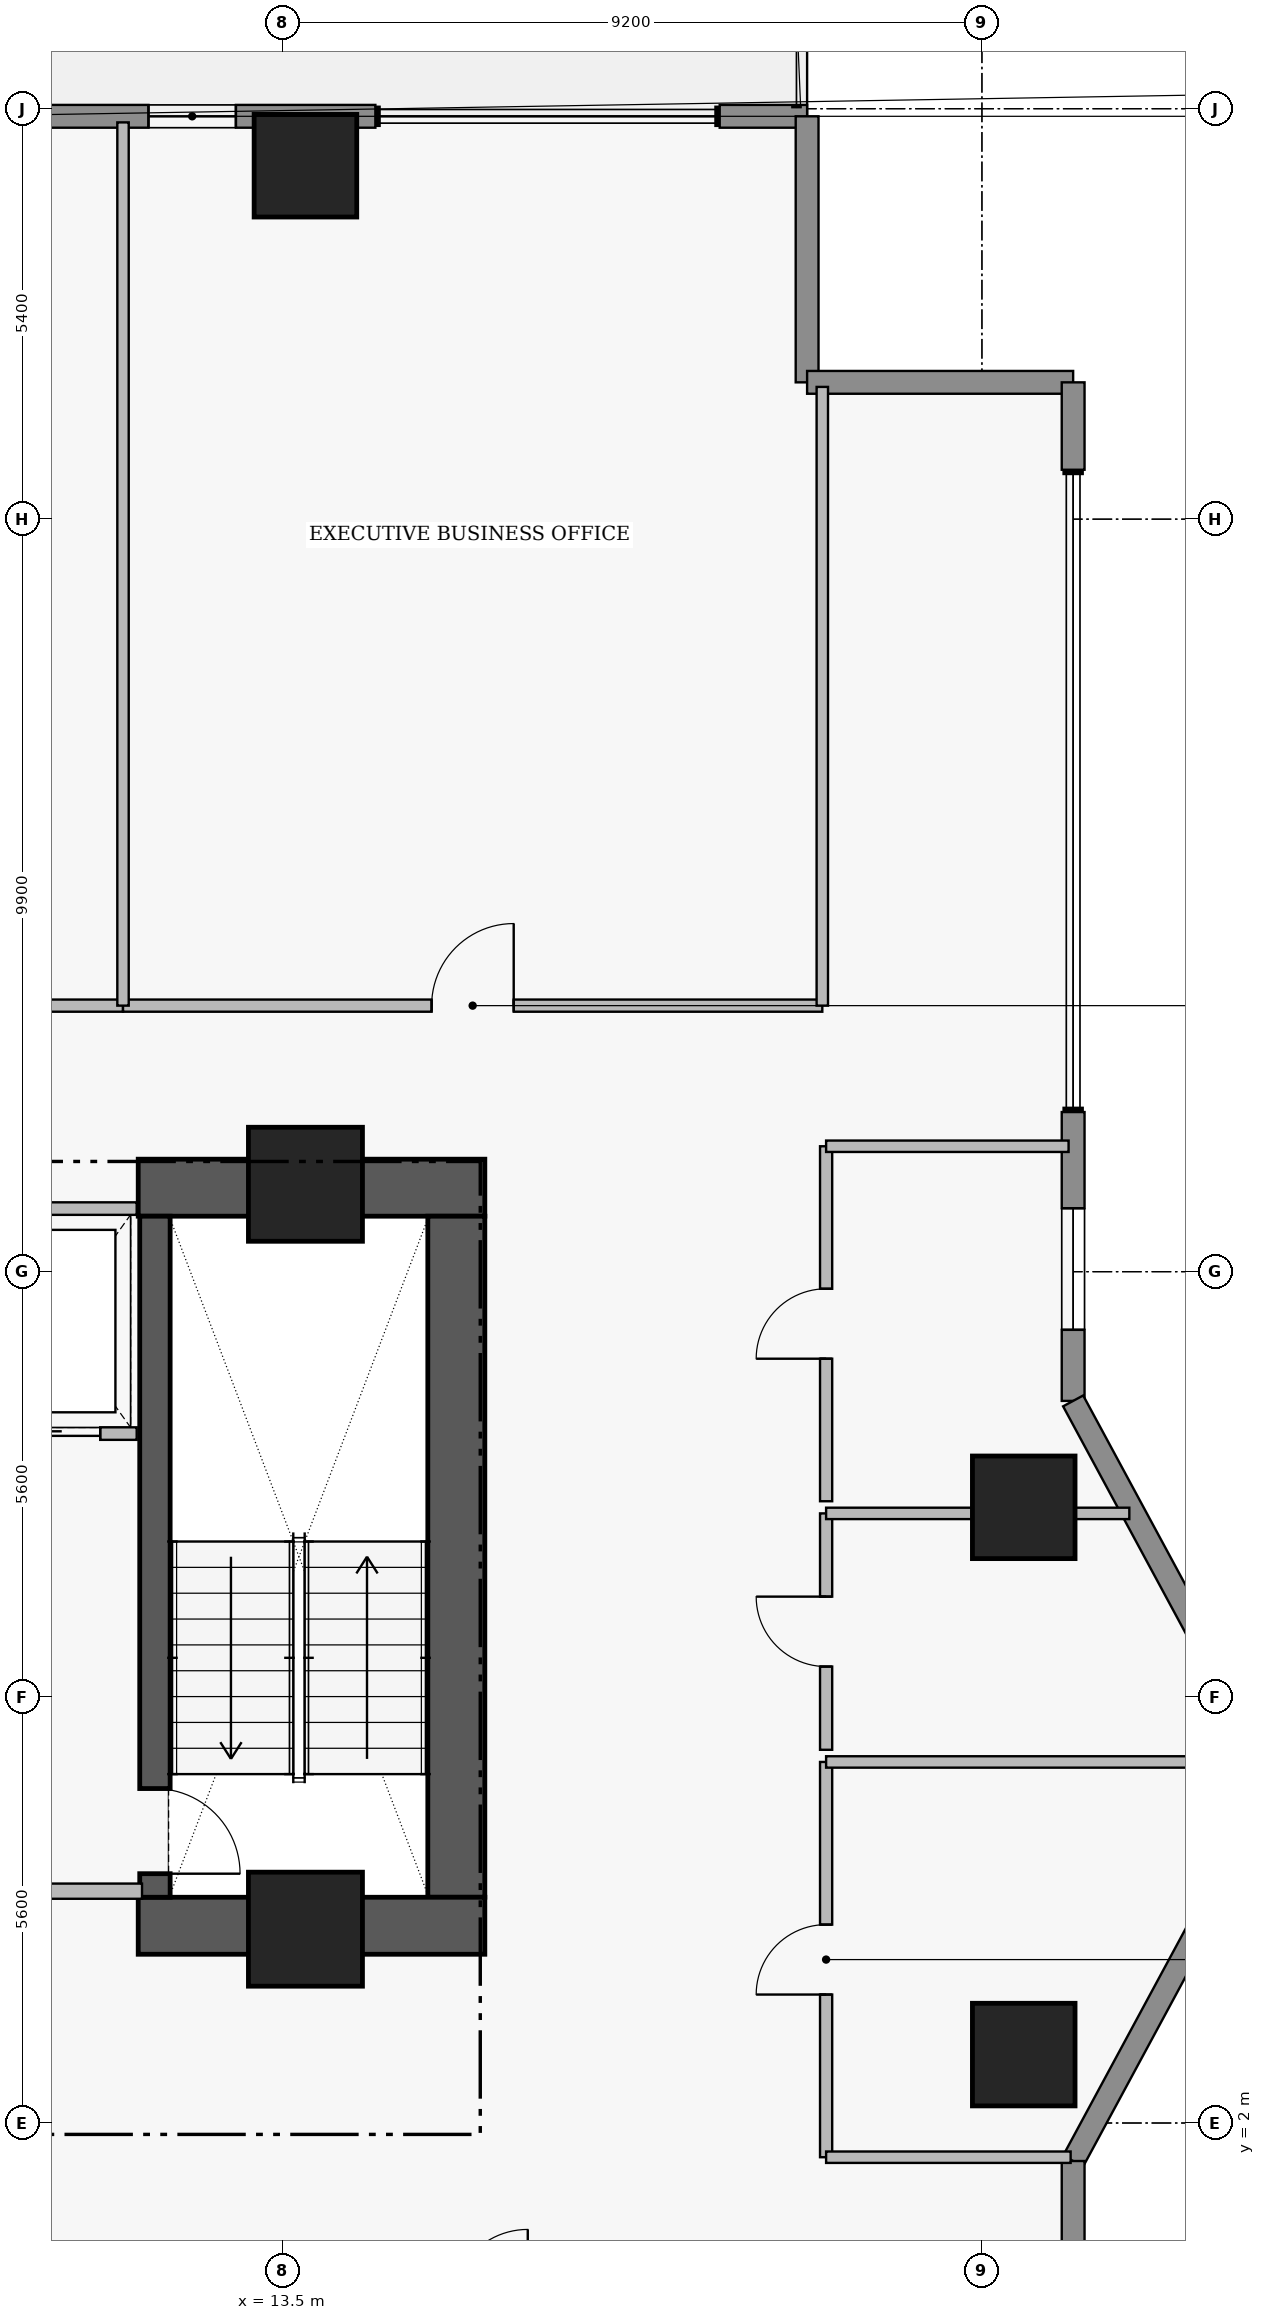
"""IFC4 building model, lengths in metres.
Left out: names, types, materials, properties, quantities, classifications, styles, units other than length and angle.
Written with IfcOpenShell. Run it as: python <this file> out.ifc"""

import sys

from ifc_helpers import new_model, si_unit, direction, frame, frame_2d, origin, origin_2d, place, context, subcontext, project, spatial, rectangle, extrude, element, fill, save


model = new_model("IFC4")
c1 = context("Model", 3, precision=1e-05, world=origin(), true_north=direction((0.0, 1.0)))
c2 = subcontext(c1, "Body", "Model", "MODEL_VIEW")
j1 = project(units=[si_unit("LENGTHUNIT", "METRE"), si_unit("PLANEANGLEUNIT", "RADIAN")], contexts=[c1])
p1 = place(None, origin())
s1 = spatial("IfcSite", under=j1, at=p1, CompositionType="ELEMENT")
p2 = place(p1, origin())
s2 = spatial("IfcBuilding", under=s1, at=p2, CompositionType="ELEMENT")
p3 = place(p2, frame((0.0, 0.0, 117.55)))
s3 = spatial("IfcBuildingStorey", under=s2, at=p3, CompositionType="ELEMENT", Elevation=117.55)
p4 = place(p3, frame((11.6, 14.305, 0.0), z_axis=(0.0, 0.0, 1.0), x_axis=(1.0, 0.0, 0.0)))
e1 = element("IfcWall", 1, at=p4, inside=s3, PredefinedType="SHEAR", context=c2, shape_type="SweptSolid", body=[
    extrude(rectangle(XDim=4.56, YDim=0.75, at=frame_2d((2.28, 0.0))), origin(), (0.0, 0.0, 1.0), 3.46),
])
p5 = place(p3, frame((15.785, 4.97, 0.0), z_axis=(0.0, 0.0, 1.0), x_axis=(0.0, 1.0, 0.0)))
e2 = element("IfcWall", 2, at=p5, inside=s3, PredefinedType="SHEAR", context=c2, shape_type="SweptSolid", body=[
    extrude(rectangle(XDim=8.96, YDim=0.75, at=frame_2d((4.48, 0.0))), origin(), (0.0, 0.0, 1.0), 3.46),
])
p6 = place(p3, frame((11.6, 4.595, 0.0), z_axis=(0.0, 0.0, 1.0), x_axis=(1.0, 0.0, 0.0)))
e3 = element("IfcWall", 3, at=p6, inside=s3, PredefinedType="SHEAR", context=c2, shape_type="SweptSolid", body=[
    extrude(rectangle(XDim=4.56, YDim=0.75, at=frame_2d((2.28, 0.0))), origin(), (0.0, 0.0, 1.0), 3.46),
])
p7 = place(p3, frame((11.82, 13.93, 0.0), z_axis=(0.0, 0.0, 1.0), x_axis=(0.0, -1.0, 0.0)))
e4 = element("IfcWall", 4, at=p7, inside=s3, PredefinedType="SHEAR", context=c2, shape_type="SweptSolid", body=[
    extrude(rectangle(XDim=8.96, YDim=0.4, at=frame_2d((4.48, 0.0))), origin(), (0.0, 0.0, 1.0), 3.46),
])
p8 = place(p7, frame((7.53, 0.0, 0.0)))
e5 = element("IfcOpeningElement", 5, at=p8, cuts=e4, PredefinedType="OPENING", context=c2, shape_type="SweptSolid", body=[
    extrude(rectangle(XDim=1.12, YDim=2.22, at=frame_2d((0.56, 1.11))), frame((0.0, 0.21, 0.0), z_axis=(0.0, -1.0, 0.0), x_axis=(1.0, 0.0, 0.0)), (0.0, 0.0, 1.0), 0.42),
])
for number, where, z_axis, x_axis in (
    (6, (13.8, 14.35, 0.0), (0.0, 0.0, 1.0), (1.0, 0.0, 0.0)),
    (7, (13.8, 4.55, 0.0), (0.0, 0.0, 1.0), (1.0, 0.0, 0.0)),
):
    element("IfcColumn", number, at=place(p3, frame(where, z_axis=z_axis, x_axis=x_axis)), inside=s3, PredefinedType="COLUMN", context=c2, shape_type="SweptSolid", body=[
        extrude(rectangle(XDim=1.5, YDim=1.5, at=origin_2d()), origin(), (0.0, 0.0, 1.0), 3.65),
    ])
for number, where, z_axis, x_axis in (
    (8, (13.8, 27.75, 0.0), (0.0, 0.0, 1.0), (1.0, 0.0, 0.0)),
    (9, (23.25, 2.9, 0.0), (0.0, 0.0, 1.0), (1.0, 0.0, 0.0)),
    (10, (23.25, 10.1, 0.0), (0.0, 0.0, 1.0), (1.0, 0.0, 0.0)),
):
    element("IfcColumn", number, at=place(p3, frame(where, z_axis=z_axis, x_axis=x_axis)), inside=s3, PredefinedType="COLUMN", context=c2, shape_type="SweptSolid", body=[
        extrude(rectangle(XDim=1.35, YDim=1.35, at=origin_2d()), origin(), (0.0, 0.0, 1.0), 3.65),
    ])
p9 = place(p3, frame((7.885, 28.4, 0.0), z_axis=(0.0, 0.0, 1.0), x_axis=(1.0, 0.0, 0.0)))
e11 = element("IfcWall", 11, at=p9, inside=s3, PredefinedType="STANDARD", context=c2, shape_type="SweptSolid", body=[
    extrude(rectangle(XDim=6.835, YDim=0.3, at=frame_2d((3.417, 0.0))), origin(), (0.0, 0.0, 1.0), 3.43),
])
p10 = place(p9, frame((0.65, 0.0, 0.0)))
e12 = element("IfcOpeningElement", 12, at=p10, cuts=e11, PredefinedType="OPENING", context=c2, shape_type="SweptSolid", body=[
    extrude(rectangle(XDim=1.05, YDim=2.2, at=frame_2d((0.525, 1.1))), frame((0.0, 0.16, 0.0), z_axis=(0.0, -1.0, 0.0), x_axis=(1.0, 0.0, 0.0)), (0.0, 0.0, 1.0), 0.32),
])
p11 = place(p9, frame((3.85, 0.0, 0.95)))
e13 = element("IfcOpeningElement", 13, at=p11, cuts=e11, PredefinedType="OPENING", context=c2, shape_type="SweptSolid", body=[
    extrude(rectangle(XDim=1.15, YDim=1.55, at=frame_2d((0.575, 0.775))), frame((0.0, 0.16, 0.0), z_axis=(0.0, -1.0, 0.0), x_axis=(1.0, 0.0, 0.0)), (0.0, 0.0, 1.0), 0.32),
])
p12 = place(p3, frame((19.25, 28.4, 0.0), z_axis=(0.0, 0.0, 1.0), x_axis=(1.0, 0.0, 0.0)))
e14 = element("IfcWall", 14, at=p12, inside=s3, PredefinedType="STANDARD", context=c2, shape_type="SweptSolid", body=[
    extrude(rectangle(XDim=1.15, YDim=0.3, at=frame_2d((0.575, 0.0))), origin(), (0.0, 0.0, 1.0), 3.43),
])
for number, where, z_axis, x_axis in (
    (15, (20.4, 28.4, 0.0), (0.0, 0.0, 1.0), (0.0, -1.0, 0.0)),
    (16, (20.4, 24.9, 0.0), (0.0, 0.0, 1.0), (1.0, 0.0, 0.0)),
):
    element("IfcWall", number, at=place(p3, frame(where, z_axis=z_axis, x_axis=x_axis)), inside=s3, PredefinedType="STANDARD", context=c2, shape_type="SweptSolid", body=[
        extrude(rectangle(XDim=3.5, YDim=0.3, at=frame_2d((1.75, 0.0))), origin(), (0.0, 0.0, 1.0), 3.43),
    ])
p13 = place(p3, frame((23.9, 24.9, 0.0), z_axis=(0.0, 0.0, 1.0), x_axis=(0.0, -1.0, 0.0)))
e17 = element("IfcWall", 17, at=p13, inside=s3, PredefinedType="STANDARD", context=c2, shape_type="SweptSolid", body=[
    extrude(rectangle(XDim=1.15, YDim=0.3, at=frame_2d((0.575, 0.0))), origin(), (0.0, 0.0, 1.0), 3.43),
])
p14 = place(p3, frame((23.9, 15.3, 0.0), z_axis=(0.0, 0.0, 1.0), x_axis=(0.0, -1.0, 0.0)))
e18 = element("IfcWall", 18, at=p14, inside=s3, PredefinedType="STANDARD", context=c2, shape_type="SweptSolid", body=[
    extrude(rectangle(XDim=3.8, YDim=0.3, at=frame_2d((1.9, 0.0))), origin(), (0.0, 0.0, 1.0), 3.43),
])
p15 = place(p14, frame((1.265, 0.0, 0.85)))
e19 = element("IfcOpeningElement", 19, at=p15, cuts=e18, PredefinedType="OPENING", context=c2, shape_type="SweptSolid", body=[
    extrude(rectangle(XDim=1.6, YDim=1.8, at=frame_2d((0.8, 0.9))), frame((0.0, 0.16, 0.0), z_axis=(0.0, -1.0, 0.0), x_axis=(1.0, 0.0, 0.0)), (0.0, 0.0, 1.0), 0.32),
])
for number, where, z_axis, x_axis in (
    (20, (23.9, 11.5, 0.0), (0.0, 0.0, 1.0), (0.475, -0.88, 0.0)),
    (21, (26.6, 6.5, 0.0), (0.0, 0.0, 1.0), (-0.475, -0.88, 0.0)),
):
    element("IfcWall", number, at=place(p3, frame(where, z_axis=z_axis, x_axis=x_axis)), inside=s3, PredefinedType="STANDARD", context=c2, shape_type="SweptSolid", body=[
        extrude(rectangle(XDim=5.683, YDim=0.3, at=frame_2d((2.841, 0.0))), origin(), (0.0, 0.0, 1.0), 3.43),
    ])
p16 = place(p3, frame((23.9, 1.5, 0.0), z_axis=(0.0, 0.0, 1.0), x_axis=(0.0, -1.0, 0.0)))
e22 = element("IfcWall", 22, at=p16, inside=s3, PredefinedType="STANDARD", context=c2, shape_type="SweptSolid", body=[
    extrude(rectangle(XDim=1.15, YDim=0.3, at=frame_2d((0.575, 0.0))), origin(), (0.0, 0.0, 1.0), 3.43),
])
p17 = place(p3, frame((9.42, 11.07, 0.0), z_axis=(0.0, 0.0, 1.0), x_axis=(1.0, 0.0, 0.0)))
e23 = element("IfcWall", 23, at=p17, inside=s3, PredefinedType="PARTITIONING", context=c2, shape_type="SweptSolid", body=[
    extrude(rectangle(XDim=2.16, YDim=0.165, at=frame_2d((1.08, 0.0))), origin(), (0.0, 0.0, 1.0), 3.43),
])
p18 = place(p17, frame((0.53, 0.0, 0.0)))
e24 = element("IfcOpeningElement", 24, at=p18, cuts=e23, PredefinedType="OPENING", context=c2, shape_type="SweptSolid", body=[
    extrude(rectangle(XDim=1.15, YDim=2.25, at=frame_2d((0.575, 1.125))), frame((0.0, 0.093, 0.0), z_axis=(0.0, -1.0, 0.0), x_axis=(1.0, 0.0, 0.0)), (0.0, 0.0, 1.0), 0.185),
])
p19 = place(p3, frame((3.6, 16.7, 0.0), z_axis=(0.0, 0.0, 1.0), x_axis=(1.0, 0.0, 0.0)))
e25 = element("IfcWall", 25, at=p19, inside=s3, PredefinedType="PARTITIONING", context=c2, shape_type="SweptSolid", body=[
    extrude(rectangle(XDim=7.8, YDim=0.16, at=frame_2d((3.9, 0.0))), origin(), (0.0, 0.0, 1.0), 2.973),
])
p20 = place(p19, frame((4.55, 0.0, 0.0)))
e26 = element("IfcOpeningElement", 26, at=p20, cuts=e25, PredefinedType="OPENING", context=c2, shape_type="SweptSolid", body=[
    extrude(rectangle(XDim=1.0, YDim=2.15, at=frame_2d((0.5, 1.075))), frame((0.0, 0.09, 0.0), z_axis=(0.0, -1.0, 0.0), x_axis=(1.0, 0.0, 0.0)), (0.0, 0.0, 1.0), 0.18),
])
p21 = place(p3, frame((11.4, 16.7, 0.0), z_axis=(0.0, 0.0, 1.0), x_axis=(1.0, 0.0, 0.0)))
e27 = element("IfcWall", 27, at=p21, inside=s3, PredefinedType="PARTITIONING", context=c2, shape_type="SweptSolid", body=[
    extrude(rectangle(XDim=9.2, YDim=0.16, at=frame_2d((4.6, 0.0))), origin(), (0.0, 0.0, 1.0), 2.973),
])
p22 = place(p21, frame((4.06, 0.0, 0.0)))
e28 = element("IfcOpeningElement", 28, at=p22, cuts=e27, PredefinedType="OPENING", context=c2, shape_type="SweptSolid", body=[
    extrude(rectangle(XDim=1.08, YDim=2.18, at=frame_2d((0.54, 1.09))), frame((0.0, 0.09, 0.0), z_axis=(0.0, -1.0, 0.0), x_axis=(1.0, 0.0, 0.0)), (0.0, 0.0, 1.0), 0.18),
])
p23 = place(p3, frame((20.65, 1.55, 0.0), z_axis=(0.0, 0.0, 1.0), x_axis=(0.0, 1.0, 0.0)))
e29 = element("IfcWall", 29, at=p23, inside=s3, PredefinedType="PARTITIONING", context=c2, shape_type="SweptSolid", body=[
    extrude(rectangle(XDim=5.2, YDim=0.16, at=frame_2d((2.6, 0.0))), origin(), (0.0, 0.0, 1.0), 3.43),
])
p24 = place(p23, frame((2.14, 0.0, 0.0)))
e30 = element("IfcOpeningElement", 30, at=p24, cuts=e29, PredefinedType="OPENING", context=c2, shape_type="SweptSolid", body=[
    extrude(rectangle(XDim=0.92, YDim=2.12, at=frame_2d((0.46, 1.06))), frame((0.0, 0.09, 0.0), z_axis=(0.0, -1.0, 0.0), x_axis=(1.0, 0.0, 0.0)), (0.0, 0.0, 1.0), 0.18),
])
p25 = place(p3, frame((20.65, 6.91, 0.0), z_axis=(0.0, 0.0, 1.0), x_axis=(0.0, 1.0, 0.0)))
e31 = element("IfcWall", 31, at=p25, inside=s3, PredefinedType="PARTITIONING", context=c2, shape_type="SweptSolid", body=[
    extrude(rectangle(XDim=3.11, YDim=0.16, at=frame_2d((1.555, 0.0))), origin(), (0.0, 0.0, 1.0), 3.43),
])
p26 = place(p25, frame((1.095, 0.0, 0.0)))
e32 = element("IfcOpeningElement", 32, at=p26, cuts=e31, PredefinedType="OPENING", context=c2, shape_type="SweptSolid", body=[
    extrude(rectangle(XDim=0.92, YDim=2.12, at=frame_2d((0.46, 1.06))), frame((0.0, 0.09, 0.0), z_axis=(0.0, -1.0, 0.0), x_axis=(1.0, 0.0, 0.0)), (0.0, 0.0, 1.0), 0.18),
])
p27 = place(p3, frame((20.65, 10.18, 0.0), z_axis=(0.0, 0.0, 1.0), x_axis=(0.0, 1.0, 0.0)))
e33 = element("IfcWall", 33, at=p27, inside=s3, PredefinedType="PARTITIONING", context=c2, shape_type="SweptSolid", body=[
    extrude(rectangle(XDim=4.67, YDim=0.16, at=frame_2d((2.335, 0.0))), origin(), (0.0, 0.0, 1.0), 3.43),
])
p28 = place(p27, frame((1.875, 0.0, 0.0)))
e34 = element("IfcOpeningElement", 34, at=p28, cuts=e33, PredefinedType="OPENING", context=c2, shape_type="SweptSolid", body=[
    extrude(rectangle(XDim=0.92, YDim=2.12, at=frame_2d((0.46, 1.06))), frame((0.0, 0.09, 0.0), z_axis=(0.0, -1.0, 0.0), x_axis=(1.0, 0.0, 0.0)), (0.0, 0.0, 1.0), 0.18),
])
p29 = place(p3, frame((8.8, 5.05, 0.0), z_axis=(0.0, 0.0, 1.0), x_axis=(1.0, 0.0, 0.0)))
e35 = element("IfcWall", 35, at=p29, inside=s3, PredefinedType="PARTITIONING", context=c2, shape_type="SweptSolid", body=[
    extrude(rectangle(XDim=2.85, YDim=0.2, at=frame_2d((1.425, 0.0))), origin(), (0.0, 0.0, 1.0), 3.43),
])
p30 = place(p3, frame((9.42, 14.03, 0.0), z_axis=(0.0, 0.0, 1.0), x_axis=(1.0, 0.0, 0.0)))
e36 = element("IfcWall", 36, at=p30, inside=s3, PredefinedType="PARTITIONING", context=c2, shape_type="SweptSolid", body=[
    extrude(rectangle(XDim=2.16, YDim=0.165, at=frame_2d((1.08, 0.0))), origin(), (0.0, 0.0, 1.0), 3.43),
])
p31 = place(p3, frame((11.4, 16.7, 0.0), z_axis=(0.0, 0.0, 1.0), x_axis=(0.0, 1.0, 0.0)))
e37 = element("IfcWall", 37, at=p31, inside=s3, PredefinedType="PARTITIONING", context=c2, shape_type="SweptSolid", body=[
    extrude(rectangle(XDim=11.62, YDim=0.15, at=frame_2d((5.81, 0.0))), origin(), (0.0, 0.0, 1.0), 3.43),
])
p32 = place(p3, frame((20.6, 16.7, 0.0), z_axis=(0.0, 0.0, 1.0), x_axis=(0.0, 1.0, 0.0)))
e38 = element("IfcWall", 38, at=p32, inside=s3, PredefinedType="PARTITIONING", context=c2, shape_type="SweptSolid", body=[
    extrude(rectangle(XDim=8.14, YDim=0.15, at=frame_2d((4.07, 0.0))), origin(), (0.0, 0.0, 1.0), 3.43),
])
p33 = place(p3, frame((20.65, 1.55, 0.0), z_axis=(0.0, 0.0, 1.0), x_axis=(1.0, 0.0, 0.0)))
e39 = element("IfcWall", 39, at=p33, inside=s3, PredefinedType="PARTITIONING", context=c2, shape_type="SweptSolid", body=[
    extrude(rectangle(XDim=3.217, YDim=0.15, at=frame_2d((1.608, 0.0))), origin(), (0.0, 0.0, 1.0), 3.43),
])
p34 = place(p3, frame((20.65, 6.75, 0.0), z_axis=(0.0, 0.0, 1.0), x_axis=(1.0, 0.0, 0.0)))
e40 = element("IfcWall", 40, at=p34, inside=s3, PredefinedType="PARTITIONING", context=c2, shape_type="SweptSolid", body=[
    extrude(rectangle(XDim=5.755, YDim=0.15, at=frame_2d((2.877, 0.0))), origin(), (0.0, 0.0, 1.0), 3.43),
])
p35 = place(p3, frame((20.65, 10.02, 0.0), z_axis=(0.0, 0.0, 1.0), x_axis=(1.0, 0.0, 0.0)))
e41 = element("IfcWall", 41, at=p35, inside=s3, PredefinedType="PARTITIONING", context=c2, shape_type="SweptSolid", body=[
    extrude(rectangle(XDim=3.989, YDim=0.15, at=frame_2d((1.995, 0.0))), origin(), (0.0, 0.0, 1.0), 3.43),
])
p36 = place(p3, frame((20.65, 14.85, 0.0), z_axis=(0.0, 0.0, 1.0), x_axis=(1.0, 0.0, 0.0)))
e42 = element("IfcWall", 42, at=p36, inside=s3, PredefinedType="PARTITIONING", context=c2, shape_type="SweptSolid", body=[
    extrude(rectangle(XDim=3.19, YDim=0.15, at=frame_2d((1.595, 0.0))), origin(), (0.0, 0.0, 1.0), 3.43),
])
p37 = place(p11, origin())
e43 = element("IfcWindow", 43, at=p37, inside=s3, PartitioningType="SINGLE_PANEL", PredefinedType="WINDOW", context=c2, shape_type="SweptSolid", body=[
    extrude(rectangle(XDim=1.15, YDim=1.55, at=frame_2d((0.575, 0.775))), frame((0.0, 0.03, 0.0), z_axis=(0.0, -1.0, 0.0), x_axis=(1.0, 0.0, 0.0)), (0.0, 0.0, 1.0), 0.06),
])
fill(e13, e43)
p38 = place(p15, origin())
e44 = element("IfcWindow", 44, at=p38, inside=s3, PartitioningType="SINGLE_PANEL", PredefinedType="WINDOW", context=c2, shape_type="SweptSolid", body=[
    extrude(rectangle(XDim=1.6, YDim=1.8, at=frame_2d((0.8, 0.9))), frame((0.0, 0.03, 0.0), z_axis=(0.0, -1.0, 0.0), x_axis=(1.0, 0.0, 0.0)), (0.0, 0.0, 1.0), 0.06),
])
fill(e19, e44)
p39 = place(p8, origin())
e45 = element("IfcDoor", 45, at=p39, inside=s3, OperationType="SINGLE_SWING_RIGHT", PredefinedType="DOOR", context=c2, shape_type="SweptSolid", body=[
    extrude(rectangle(XDim=1.12, YDim=2.22, at=frame_2d((0.56, 1.11))), frame((0.0, 0.025, 0.0), z_axis=(0.0, -1.0, 0.0), x_axis=(1.0, 0.0, 0.0)), (0.0, 0.0, 1.0), 0.05),
])
fill(e5, e45)
p40 = place(p18, origin())
e46 = element("IfcDoor", 46, at=p40, inside=s3, OperationType="SLIDING_TO_LEFT", PredefinedType="DOOR", context=c2, shape_type="SweptSolid", body=[
    extrude(rectangle(XDim=1.15, YDim=2.25, at=frame_2d((0.575, 1.125))), frame((0.0, 0.025, 0.0), z_axis=(0.0, -1.0, 0.0), x_axis=(1.0, 0.0, 0.0)), (0.0, 0.0, 1.0), 0.05),
])
fill(e24, e46)
p41 = place(p22, origin())
e47 = element("IfcDoor", 47, at=p41, inside=s3, OperationType="SINGLE_SWING_RIGHT", PredefinedType="DOOR", context=c2, shape_type="SweptSolid", body=[
    extrude(rectangle(XDim=1.08, YDim=2.18, at=frame_2d((0.54, 1.09))), frame((0.0, 0.025, 0.0), z_axis=(0.0, -1.0, 0.0), x_axis=(1.0, 0.0, 0.0)), (0.0, 0.0, 1.0), 0.05),
])
fill(e28, e47)
p42 = place(p24, origin())
e48 = element("IfcDoor", 48, at=p42, inside=s3, OperationType="SINGLE_SWING_LEFT", PredefinedType="DOOR", context=c2, shape_type="SweptSolid", body=[
    extrude(rectangle(XDim=0.92, YDim=2.12, at=frame_2d((0.46, 1.06))), frame((0.0, 0.025, 0.0), z_axis=(0.0, -1.0, 0.0), x_axis=(1.0, 0.0, 0.0)), (0.0, 0.0, 1.0), 0.05),
])
fill(e30, e48)
p43 = place(p26, origin())
e49 = element("IfcDoor", 49, at=p43, inside=s3, OperationType="SINGLE_SWING_RIGHT", PredefinedType="DOOR", context=c2, shape_type="SweptSolid", body=[
    extrude(rectangle(XDim=0.92, YDim=2.12, at=frame_2d((0.46, 1.06))), frame((0.0, 0.025, 0.0), z_axis=(0.0, -1.0, 0.0), x_axis=(1.0, 0.0, 0.0)), (0.0, 0.0, 1.0), 0.05),
])
fill(e32, e49)
p44 = place(p28, origin())
e50 = element("IfcDoor", 50, at=p44, inside=s3, OperationType="SINGLE_SWING_LEFT", PredefinedType="DOOR", context=c2, shape_type="SweptSolid", body=[
    extrude(rectangle(XDim=0.92, YDim=2.12, at=frame_2d((0.46, 1.06))), frame((0.0, 0.025, 0.0), z_axis=(0.0, -1.0, 0.0), x_axis=(1.0, 0.0, 0.0)), (0.0, 0.0, 1.0), 0.05),
])
fill(e34, e50)
save(model, sys.argv[1])
